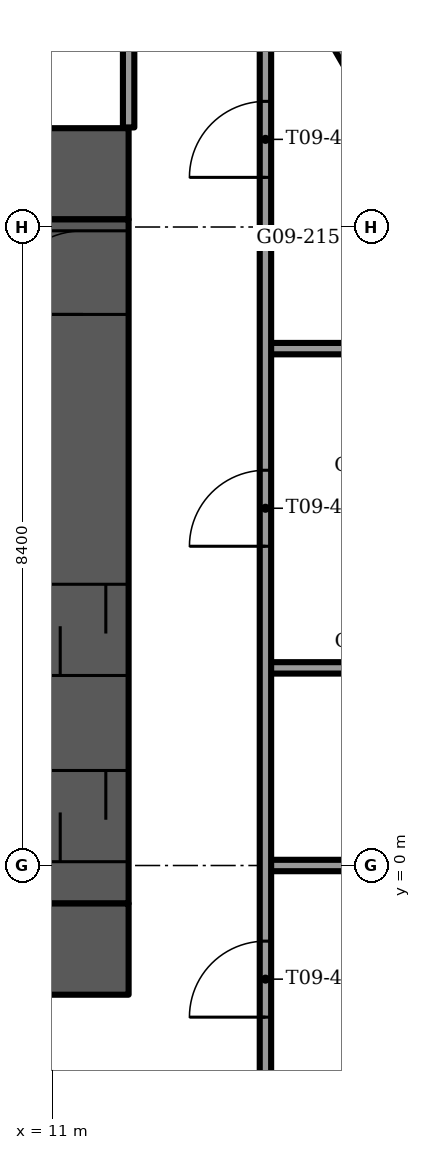
"""IFC4 building model, lengths in metres.
Left out: names, types, materials, properties, quantities, classifications, styles, units other than length and angle.
Written with IfcOpenShell. Run it as: python <this file> out.ifc"""

import sys

from ifc_helpers import new_model, si_unit, direction, frame, frame_2d, origin, place, context, subcontext, project, spatial, rectangle, extrude, element, fill, save


model = new_model("IFC4")
c1 = context("Model", 3, precision=1e-05, world=origin(), true_north=direction((0.0, 1.0)))
c2 = subcontext(c1, "Body", "Model", "MODEL_VIEW")
j1 = project(units=[si_unit("LENGTHUNIT", "METRE"), si_unit("PLANEANGLEUNIT", "RADIAN")], contexts=[c1])
p1 = place(None, origin())
s1 = spatial("IfcSite", under=j1, at=p1, CompositionType="ELEMENT")
p2 = place(p1, origin())
s2 = spatial("IfcBuilding", under=s1, at=p2, CompositionType="ELEMENT")
p3 = place(p2, frame((0.0, 0.0, 39.25)))
s3 = spatial("IfcBuildingStorey", under=s2, at=p3, CompositionType="ELEMENT", Elevation=39.25)
p4 = place(p3, frame((-12.0, -1.1, -0.3), z_axis=(0.0, 0.0, 1.0), x_axis=(1.0, 0.0, 0.0)))
e1 = element("IfcWall", 1, at=p4, inside=s3, PredefinedType="SHEAR", context=c2, shape_type="SweptSolid", body=[
    extrude(rectangle(XDim=24.0, YDim=1.2, at=frame_2d((12.0, 0.0))), origin(), (0.0, 0.0, 1.0), 3.75),
])
p5 = place(p4, frame((11.2, 0.0, 0.0)))
e2 = element("IfcOpeningElement", 2, at=p5, cuts=e1, PredefinedType="OPENING", context=c2, shape_type="SweptSolid", body=[
    extrude(rectangle(XDim=1.6, YDim=2.1, at=frame_2d((0.8, 1.05))), frame((0.0, 0.6, 0.0), z_axis=(0.0, -1.0, 0.0), x_axis=(1.0, 0.0, 0.0)), (0.0, 0.0, 1.0), 1.2),
])
p6 = place(p3, frame((-12.0, 9.1, -0.3), z_axis=(0.0, 0.0, 1.0), x_axis=(1.0, 0.0, 0.0)))
e3 = element("IfcWall", 3, at=p6, inside=s3, PredefinedType="SHEAR", context=c2, shape_type="SweptSolid", body=[
    extrude(rectangle(XDim=24.0, YDim=1.2, at=frame_2d((12.0, 0.0))), origin(), (0.0, 0.0, 1.0), 3.75),
])
p7 = place(p6, frame((11.2, 0.0, 0.0)))
e4 = element("IfcOpeningElement", 4, at=p7, cuts=e3, PredefinedType="OPENING", context=c2, shape_type="SweptSolid", body=[
    extrude(rectangle(XDim=1.6, YDim=2.1, at=frame_2d((0.8, 1.05))), frame((0.0, 0.6, 0.0), z_axis=(0.0, -1.0, 0.0), x_axis=(1.0, 0.0, 0.0)), (0.0, 0.0, 1.0), 1.2),
])
p8 = place(p6, frame((5.25, 0.0, 0.0)))
e5 = element("IfcOpeningElement", 5, at=p8, cuts=e3, PredefinedType="OPENING", context=c2, shape_type="SweptSolid", body=[
    extrude(rectangle(XDim=1.1, YDim=2.1, at=frame_2d((0.55, 1.05))), frame((0.0, 0.6, 0.0), z_axis=(0.0, -1.0, 0.0), x_axis=(1.0, 0.0, 0.0)), (0.0, 0.0, 1.0), 1.2),
])
p9 = place(p6, frame((17.65, 0.0, 0.0)))
e6 = element("IfcOpeningElement", 6, at=p9, cuts=e3, PredefinedType="OPENING", context=c2, shape_type="SweptSolid", body=[
    extrude(rectangle(XDim=1.1, YDim=2.1, at=frame_2d((0.55, 1.05))), frame((0.0, 0.6, 0.0), z_axis=(0.0, -1.0, 0.0), x_axis=(1.0, 0.0, 0.0)), (0.0, 0.0, 1.0), 1.2),
])
p10 = place(p3, frame((11.4, -0.5, -0.3), z_axis=(0.0, 0.0, 1.0), x_axis=(0.0, 1.0, 0.0)))
e7 = element("IfcWall", 7, at=p10, inside=s3, PredefinedType="SHEAR", context=c2, shape_type="SweptSolid", body=[
    extrude(rectangle(XDim=9.0, YDim=1.2, at=frame_2d((4.5, 0.0))), origin(), (0.0, 0.0, 1.0), 3.75),
])
p11 = place(p10, frame((7.75, 0.0, 0.0)))
e8 = element("IfcOpeningElement", 8, at=p11, cuts=e7, PredefinedType="OPENING", context=c2, shape_type="SweptSolid", body=[
    extrude(rectangle(XDim=1.1, YDim=2.1, at=frame_2d((0.55, 1.05))), frame((0.0, 0.6, 0.0), z_axis=(0.0, -1.0, 0.0), x_axis=(1.0, 0.0, 0.0)), (0.0, 0.0, 1.0), 1.2),
])
p12 = place(p10, frame((0.55, 0.0, 0.0)))
e9 = element("IfcOpeningElement", 9, at=p12, cuts=e7, PredefinedType="OPENING", context=c2, shape_type="SweptSolid", body=[
    extrude(rectangle(XDim=1.2, YDim=2.1, at=frame_2d((0.6, 1.05))), frame((0.0, 0.6, 0.0), z_axis=(0.0, -1.0, 0.0), x_axis=(1.0, 0.0, 0.0)), (0.0, 0.0, 1.0), 1.2),
])
p13 = place(p10, frame((3.0, 0.0, 0.0)))
e10 = element("IfcOpeningElement", 10, at=p13, cuts=e7, PredefinedType="OPENING", context=c2, shape_type="SweptSolid", body=[
    extrude(rectangle(XDim=1.2, YDim=2.1, at=frame_2d((0.6, 1.05))), frame((0.0, 0.6, 0.0), z_axis=(0.0, -1.0, 0.0), x_axis=(1.0, 0.0, 0.0)), (0.0, 0.0, 1.0), 1.2),
])
p14 = place(p3, frame((11.087, -17.647, 0.0), z_axis=(0.0, 0.0, 1.0), x_axis=(0.499999841607, 0.866025495233, 0.0)))
e11 = element("IfcWall", 11, at=p14, inside=s3, PredefinedType="SOLIDWALL", context=c2, shape_type="SweptSolid", body=[
    extrude(rectangle(XDim=19.479, YDim=0.15, at=frame_2d((9.739, 0.0))), origin(), (0.0, 0.0, 1.0), 3.45),
])
p15 = place(p14, frame((1.639, 0.0, 0.15)))
e12 = element("IfcOpeningElement", 12, at=p15, cuts=e11, PredefinedType="OPENING", context=c2, shape_type="SweptSolid", body=[
    extrude(rectangle(XDim=1.8, YDim=2.85, at=frame_2d((0.9, 1.425))), frame((0.0, 0.075, 0.0), z_axis=(0.0, -1.0, 0.0), x_axis=(1.0, 0.0, 0.0)), (0.0, 0.0, 1.0), 0.15),
])
p16 = place(p14, frame((3.739, 0.0, 0.0)))
e13 = element("IfcOpeningElement", 13, at=p16, cuts=e11, PredefinedType="OPENING", context=c2, shape_type="SweptSolid", body=[
    extrude(rectangle(XDim=1.5, YDim=2.4, at=frame_2d((0.75, 1.2))), frame((0.0, 0.075, 0.0), z_axis=(0.0, -1.0, 0.0), x_axis=(1.0, 0.0, 0.0)), (0.0, 0.0, 1.0), 0.15),
])
p17 = place(p14, frame((5.839, 0.0, 0.15)))
e14 = element("IfcOpeningElement", 14, at=p17, cuts=e11, PredefinedType="OPENING", context=c2, shape_type="SweptSolid", body=[
    extrude(rectangle(XDim=1.8, YDim=2.85, at=frame_2d((0.9, 1.425))), frame((0.0, 0.075, 0.0), z_axis=(0.0, -1.0, 0.0), x_axis=(1.0, 0.0, 0.0)), (0.0, 0.0, 1.0), 0.15),
])
p18 = place(p14, frame((7.939, 0.0, 0.0)))
e15 = element("IfcOpeningElement", 15, at=p18, cuts=e11, PredefinedType="OPENING", context=c2, shape_type="SweptSolid", body=[
    extrude(rectangle(XDim=1.5, YDim=2.4, at=frame_2d((0.75, 1.2))), frame((0.0, 0.075, 0.0), z_axis=(0.0, -1.0, 0.0), x_axis=(1.0, 0.0, 0.0)), (0.0, 0.0, 1.0), 0.15),
])
p19 = place(p14, frame((10.039, 0.0, 0.15)))
e16 = element("IfcOpeningElement", 16, at=p19, cuts=e11, PredefinedType="OPENING", context=c2, shape_type="SweptSolid", body=[
    extrude(rectangle(XDim=1.8, YDim=2.85, at=frame_2d((0.9, 1.425))), frame((0.0, 0.075, 0.0), z_axis=(0.0, -1.0, 0.0), x_axis=(1.0, 0.0, 0.0)), (0.0, 0.0, 1.0), 0.15),
])
p20 = place(p14, frame((12.139, 0.0, 0.0)))
e17 = element("IfcOpeningElement", 17, at=p20, cuts=e11, PredefinedType="OPENING", context=c2, shape_type="SweptSolid", body=[
    extrude(rectangle(XDim=1.5, YDim=2.4, at=frame_2d((0.75, 1.2))), frame((0.0, 0.075, 0.0), z_axis=(0.0, -1.0, 0.0), x_axis=(1.0, 0.0, 0.0)), (0.0, 0.0, 1.0), 0.15),
])
p21 = place(p14, frame((14.239, 0.0, 0.15)))
e18 = element("IfcOpeningElement", 18, at=p21, cuts=e11, PredefinedType="OPENING", context=c2, shape_type="SweptSolid", body=[
    extrude(rectangle(XDim=0.9, YDim=2.85, at=frame_2d((0.45, 1.425))), frame((0.0, 0.075, 0.0), z_axis=(0.0, -1.0, 0.0), x_axis=(1.0, 0.0, 0.0)), (0.0, 0.0, 1.0), 0.15),
])
p22 = place(p3, frame((20.826, 0.287, 0.0), z_axis=(0.0, 0.0, 1.0), x_axis=(-0.500006057782, 0.866021906294, 0.0)))
e19 = element("IfcWall", 19, at=p22, inside=s3, PredefinedType="SOLIDWALL", context=c2, shape_type="SweptSolid", body=[
    extrude(rectangle(XDim=23.1, YDim=0.15, at=frame_2d((11.55, 0.0))), origin(), (0.0, 0.0, 1.0), 3.45),
])
p23 = place(p22, frame((4.165, 0.0, 0.15)))
e20 = element("IfcOpeningElement", 20, at=p23, cuts=e19, PredefinedType="OPENING", context=c2, shape_type="SweptSolid", body=[
    extrude(rectangle(XDim=0.9, YDim=2.85, at=frame_2d((0.45, 1.425))), frame((0.0, 0.075, 0.0), z_axis=(0.0, -1.0, 0.0), x_axis=(1.0, 0.0, 0.0)), (0.0, 0.0, 1.0), 0.15),
])
p24 = place(p22, frame((5.645, 0.0, 0.15)))
e21 = element("IfcOpeningElement", 21, at=p24, cuts=e19, PredefinedType="OPENING", context=c2, shape_type="SweptSolid", body=[
    extrude(rectangle(XDim=1.5, YDim=2.85, at=frame_2d((0.75, 1.425))), frame((0.0, 0.075, 0.0), z_axis=(0.0, -1.0, 0.0), x_axis=(1.0, 0.0, 0.0)), (0.0, 0.0, 1.0), 0.15),
])
p25 = place(p22, frame((8.365, 0.0, 0.15)))
e22 = element("IfcOpeningElement", 22, at=p25, cuts=e19, PredefinedType="OPENING", context=c2, shape_type="SweptSolid", body=[
    extrude(rectangle(XDim=1.8, YDim=2.85, at=frame_2d((0.9, 1.425))), frame((0.0, 0.075, 0.0), z_axis=(0.0, -1.0, 0.0), x_axis=(1.0, 0.0, 0.0)), (0.0, 0.0, 1.0), 0.15),
])
p26 = place(p22, frame((10.465, 0.0, 0.15)))
e23 = element("IfcOpeningElement", 23, at=p26, cuts=e19, PredefinedType="OPENING", context=c2, shape_type="SweptSolid", body=[
    extrude(rectangle(XDim=1.5, YDim=2.85, at=frame_2d((0.75, 1.425))), frame((0.0, 0.075, 0.0), z_axis=(0.0, -1.0, 0.0), x_axis=(1.0, 0.0, 0.0)), (0.0, 0.0, 1.0), 0.15),
])
p27 = place(p22, frame((12.564, 0.0, 0.15)))
e24 = element("IfcOpeningElement", 24, at=p27, cuts=e19, PredefinedType="OPENING", context=c2, shape_type="SweptSolid", body=[
    extrude(rectangle(XDim=0.9, YDim=2.85, at=frame_2d((0.45, 1.425))), frame((0.0, 0.075, 0.0), z_axis=(0.0, -1.0, 0.0), x_axis=(1.0, 0.0, 0.0)), (0.0, 0.0, 1.0), 0.15),
])
p28 = place(p22, frame((14.665, 0.0, 0.15)))
e25 = element("IfcOpeningElement", 25, at=p28, cuts=e19, PredefinedType="OPENING", context=c2, shape_type="SweptSolid", body=[
    extrude(rectangle(XDim=1.5, YDim=2.85, at=frame_2d((0.75, 1.425))), frame((0.0, 0.075, 0.0), z_axis=(0.0, -1.0, 0.0), x_axis=(1.0, 0.0, 0.0)), (0.0, 0.0, 1.0), 0.15),
])
p29 = place(p22, frame((17.775, 0.0, 0.15)))
e26 = element("IfcOpeningElement", 26, at=p29, cuts=e19, PredefinedType="OPENING", context=c2, shape_type="SweptSolid", body=[
    extrude(rectangle(XDim=0.9, YDim=2.85, at=frame_2d((0.45, 1.425))), frame((0.0, 0.075, 0.0), z_axis=(0.0, -1.0, 0.0), x_axis=(1.0, 0.0, 0.0)), (0.0, 0.0, 1.0), 0.15),
])
p30 = place(p22, frame((18.865, 0.0, 0.0)))
e27 = element("IfcOpeningElement", 27, at=p30, cuts=e19, PredefinedType="OPENING", context=c2, shape_type="SweptSolid", body=[
    extrude(rectangle(XDim=1.5, YDim=2.4, at=frame_2d((0.75, 1.2))), frame((0.0, 0.075, 0.0), z_axis=(0.0, -1.0, 0.0), x_axis=(1.0, 0.0, 0.0)), (0.0, 0.0, 1.0), 0.15),
])
p31 = place(p22, frame((0.322, 0.0, 0.15)))
e28 = element("IfcOpeningElement", 28, at=p31, cuts=e19, PredefinedType="OPENING", context=c2, shape_type="SweptSolid", body=[
    extrude(rectangle(XDim=1.8, YDim=2.73, at=frame_2d((0.9, 1.365))), frame((0.0, 0.075, 0.0), z_axis=(0.0, -1.0, 0.0), x_axis=(1.0, 0.0, 0.0)), (0.0, 0.0, 1.0), 0.15),
])
p32 = place(p22, frame((21.032, 0.0, 0.15)))
e29 = element("IfcOpeningElement", 29, at=p32, cuts=e19, PredefinedType="OPENING", context=c2, shape_type="SweptSolid", body=[
    extrude(rectangle(XDim=1.8, YDim=2.73, at=frame_2d((0.9, 1.365))), frame((0.0, 0.075, 0.0), z_axis=(0.0, -1.0, 0.0), x_axis=(1.0, 0.0, 0.0)), (0.0, 0.0, 1.0), 0.15),
])
p33 = place(p3, frame((13.8, 0.0, 0.0), z_axis=(0.0, 0.0, 1.0), x_axis=(1.0, 0.0, 0.0)))
e30 = element("IfcWall", 30, at=p33, inside=s3, PredefinedType="PARTITIONING", context=c2, shape_type="SweptSolid", body=[
    extrude(rectangle(XDim=3.2, YDim=0.15, at=frame_2d((1.6, 0.0))), origin(), (0.0, 0.0, 1.0), 3.45),
])
p34 = place(p33, frame((1.15, 0.0, 0.0)))
e31 = element("IfcOpeningElement", 31, at=p34, cuts=e30, PredefinedType="OPENING", context=c2, shape_type="SweptSolid", body=[
    extrude(rectangle(XDim=0.9, YDim=2.1, at=frame_2d((0.45, 1.05))), frame((0.0, 0.075, 0.0), z_axis=(0.0, -1.0, 0.0), x_axis=(1.0, 0.0, 0.0)), (0.0, 0.0, 1.0), 0.15),
])
p35 = place(p3, frame((13.8, 2.6, 0.0), z_axis=(0.0, 0.0, 1.0), x_axis=(1.0, 0.0, 0.0)))
e32 = element("IfcWall", 32, at=p35, inside=s3, PredefinedType="PARTITIONING", context=c2, shape_type="SweptSolid", body=[
    extrude(rectangle(XDim=5.743, YDim=0.15, at=frame_2d((2.872, 0.0))), origin(), (0.0, 0.0, 1.0), 3.45),
])
p36 = place(p3, frame((13.8, 6.8, 0.0), z_axis=(0.0, 0.0, 1.0), x_axis=(1.0, 0.0, 0.0)))
e33 = element("IfcWall", 33, at=p36, inside=s3, PredefinedType="PARTITIONING", context=c2, shape_type="SweptSolid", body=[
    extrude(rectangle(XDim=3.318, YDim=0.15, at=frame_2d((1.659, 0.0))), origin(), (0.0, 0.0, 1.0), 3.45),
])
p37 = place(p3, frame((13.8, -3.7, 0.0), z_axis=(0.0, 0.0, 1.0), x_axis=(0.0, 1.0, 0.0)))
e34 = element("IfcWall", 34, at=p37, inside=s3, PredefinedType="PARTITIONING", context=c2, shape_type="SweptSolid", body=[
    extrude(rectangle(XDim=16.247, YDim=0.15, at=frame_2d((8.124, 0.0))), origin(), (0.0, 0.0, 1.0), 3.45),
])
p38 = place(p37, frame((1.705, 0.0, 0.0)))
e35 = element("IfcOpeningElement", 35, at=p38, cuts=e34, PredefinedType="OPENING", context=c2, shape_type="SweptSolid", body=[
    extrude(rectangle(XDim=1.0, YDim=2.1, at=frame_2d((0.5, 1.05))), frame((0.0, 0.075, 0.0), z_axis=(0.0, -1.0, 0.0), x_axis=(1.0, 0.0, 0.0)), (0.0, 0.0, 1.0), 0.15),
])
p39 = place(p37, frame((7.9, 0.0, 0.0)))
e36 = element("IfcOpeningElement", 36, at=p39, cuts=e34, PredefinedType="OPENING", context=c2, shape_type="SweptSolid", body=[
    extrude(rectangle(XDim=1.0, YDim=2.1, at=frame_2d((0.5, 1.05))), frame((0.0, 0.075, 0.0), z_axis=(0.0, -1.0, 0.0), x_axis=(1.0, 0.0, 0.0)), (0.0, 0.0, 1.0), 0.15),
])
p40 = place(p37, frame((12.753, 0.0, 0.0)))
e37 = element("IfcOpeningElement", 37, at=p40, cuts=e34, PredefinedType="OPENING", context=c2, shape_type="SweptSolid", body=[
    extrude(rectangle(XDim=1.0, YDim=2.1, at=frame_2d((0.5, 1.05))), frame((0.0, 0.075, 0.0), z_axis=(0.0, -1.0, 0.0), x_axis=(1.0, 0.0, 0.0)), (0.0, 0.0, 1.0), 0.15),
])
p41 = place(p3, frame((12.0, 9.71, 0.0), z_axis=(0.0, 0.0, 1.0), x_axis=(0.0, 1.0, 0.0)))
e38 = element("IfcWall", 38, at=p41, inside=s3, PredefinedType="PARTITIONING", context=c2, shape_type="SweptSolid", body=[
    extrude(rectangle(XDim=3.89, YDim=0.15, at=frame_2d((1.945, 0.0))), origin(), (0.0, 0.0, 1.0), 3.45),
])
p42 = place(p11, origin())
e39 = element("IfcDoor", 39, at=p42, inside=s3, OperationType="SINGLE_SWING_RIGHT", PredefinedType="DOOR", context=c2, shape_type="SweptSolid", body=[
    extrude(rectangle(XDim=1.1, YDim=2.1, at=frame_2d((0.55, 1.05))), frame((0.0, 0.025, 0.0), z_axis=(0.0, -1.0, 0.0), x_axis=(1.0, 0.0, 0.0)), (0.0, 0.0, 1.0), 0.05),
])
fill(e8, e39)
p43 = place(p12, origin())
e40 = element("IfcDoor", 40, at=p43, inside=s3, OperationType="SLIDING_TO_LEFT", PredefinedType="DOOR", context=c2, shape_type="SweptSolid", body=[
    extrude(rectangle(XDim=1.2, YDim=2.1, at=frame_2d((0.6, 1.05))), frame((0.0, 0.025, 0.0), z_axis=(0.0, -1.0, 0.0), x_axis=(1.0, 0.0, 0.0)), (0.0, 0.0, 1.0), 0.05),
])
fill(e9, e40)
p44 = place(p13, origin())
e41 = element("IfcDoor", 41, at=p44, inside=s3, OperationType="SLIDING_TO_LEFT", PredefinedType="DOOR", context=c2, shape_type="SweptSolid", body=[
    extrude(rectangle(XDim=1.2, YDim=2.1, at=frame_2d((0.6, 1.05))), frame((0.0, 0.025, 0.0), z_axis=(0.0, -1.0, 0.0), x_axis=(1.0, 0.0, 0.0)), (0.0, 0.0, 1.0), 0.05),
])
fill(e10, e41)
p45 = place(p38, origin())
e42 = element("IfcDoor", 42, at=p45, inside=s3, OperationType="SINGLE_SWING_LEFT", PredefinedType="DOOR", context=c2, shape_type="SweptSolid", body=[
    extrude(rectangle(XDim=1.0, YDim=2.1, at=frame_2d((0.5, 1.05))), frame((0.0, 0.025, 0.0), z_axis=(0.0, -1.0, 0.0), x_axis=(1.0, 0.0, 0.0)), (0.0, 0.0, 1.0), 0.05),
])
fill(e35, e42)
p46 = place(p39, origin())
e43 = element("IfcDoor", 43, at=p46, inside=s3, OperationType="SINGLE_SWING_LEFT", PredefinedType="DOOR", context=c2, shape_type="SweptSolid", body=[
    extrude(rectangle(XDim=1.0, YDim=2.1, at=frame_2d((0.5, 1.05))), frame((0.0, 0.025, 0.0), z_axis=(0.0, -1.0, 0.0), x_axis=(1.0, 0.0, 0.0)), (0.0, 0.0, 1.0), 0.05),
])
fill(e36, e43)
p47 = place(p40, origin())
e44 = element("IfcDoor", 44, at=p47, inside=s3, OperationType="SINGLE_SWING_LEFT", PredefinedType="DOOR", context=c2, shape_type="SweptSolid", body=[
    extrude(rectangle(XDim=1.0, YDim=2.1, at=frame_2d((0.5, 1.05))), frame((0.0, 0.025, 0.0), z_axis=(0.0, -1.0, 0.0), x_axis=(1.0, 0.0, 0.0)), (0.0, 0.0, 1.0), 0.05),
])
fill(e37, e44)
save(model, sys.argv[1])
